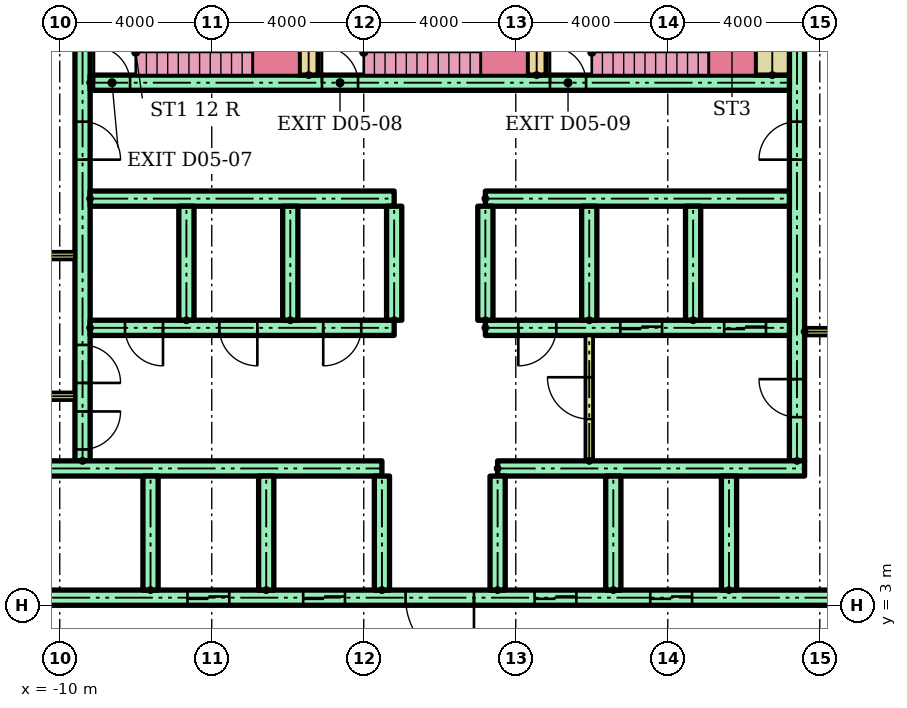
"""IFC4 building model, lengths in metres.
Left out: names, types, materials, properties, quantities, classifications, styles, units other than length and angle.
Written with IfcOpenShell. Run it as: python <this file> out.ifc"""

import sys

from ifc_helpers import new_model, si_unit, direction, frame, frame_2d, origin, place, context, subcontext, project, spatial, rectangle, extrude, element, fill, save


model = new_model("IFC4")
c1 = context("Model", 3, precision=1e-05, world=origin(), true_north=direction((0.0, 1.0)))
c2 = subcontext(c1, "Body", "Model", "MODEL_VIEW")
j1 = project(units=[si_unit("LENGTHUNIT", "METRE"), si_unit("PLANEANGLEUNIT", "RADIAN")], contexts=[c1])
p1 = place(None, origin())
s1 = spatial("IfcSite", under=j1, at=p1, CompositionType="ELEMENT")
p2 = place(p1, origin())
s2 = spatial("IfcBuilding", under=s1, at=p2, CompositionType="ELEMENT")
p3 = place(p2, frame((0.0, 0.0, 22.0)))
s3 = spatial("IfcBuildingStorey", under=s2, at=p3, CompositionType="ELEMENT", Elevation=22.0)
p4 = place(p3, frame((-9.4, 6.8, 0.0), z_axis=(0.0, 0.0, 1.0), x_axis=(0.0, 1.0, 0.0)))
e1 = element("IfcWall", 1, at=p4, inside=s3, PredefinedType="SHEAR", context=c2, shape_type="SweptSolid", body=[
    extrude(rectangle(XDim=12.7, YDim=0.4, at=frame_2d((6.35, 0.0))), origin(), (0.0, 0.0, 1.0), 3.2),
])
p5 = place(p4, frame((0.3, 0.0, 0.0)))
e2 = element("IfcOpeningElement", 2, at=p5, cuts=e1, PredefinedType="OPENING", context=c2, shape_type="SweptSolid", body=[
    extrude(rectangle(XDim=1.0, YDim=2.1, at=frame_2d((0.5, 1.05))), frame((0.0, 0.21, 0.0), z_axis=(0.0, -1.0, 0.0), x_axis=(1.0, 0.0, 0.0)), (0.0, 0.0, 1.0), 0.42),
])
p6 = place(p4, frame((2.05, 0.0, 0.0)))
e3 = element("IfcOpeningElement", 3, at=p6, cuts=e1, PredefinedType="OPENING", context=c2, shape_type="SweptSolid", body=[
    extrude(rectangle(XDim=1.0, YDim=2.1, at=frame_2d((0.5, 1.05))), frame((0.0, 0.21, 0.0), z_axis=(0.0, -1.0, 0.0), x_axis=(1.0, 0.0, 0.0)), (0.0, 0.0, 1.0), 0.42),
])
p7 = place(p4, frame((7.925, 0.0, 0.0)))
e4 = element("IfcOpeningElement", 4, at=p7, cuts=e1, PredefinedType="OPENING", context=c2, shape_type="SweptSolid", body=[
    extrude(rectangle(XDim=1.0, YDim=2.1, at=frame_2d((0.5, 1.05))), frame((0.0, 0.21, 0.0), z_axis=(0.0, -1.0, 0.0), x_axis=(1.0, 0.0, 0.0)), (0.0, 0.0, 1.0), 0.42),
])
p8 = place(p3, frame((9.4, 6.8, 0.0), z_axis=(0.0, 0.0, 1.0), x_axis=(0.0, 1.0, 0.0)))
e5 = element("IfcWall", 5, at=p8, inside=s3, PredefinedType="SHEAR", context=c2, shape_type="SweptSolid", body=[
    extrude(rectangle(XDim=12.7, YDim=0.4, at=frame_2d((6.35, 0.0))), origin(), (0.0, 0.0, 1.0), 3.2),
])
p9 = place(p8, frame((1.15, 0.0, 0.0)))
e6 = element("IfcOpeningElement", 6, at=p9, cuts=e5, PredefinedType="OPENING", context=c2, shape_type="SweptSolid", body=[
    extrude(rectangle(XDim=1.0, YDim=2.1, at=frame_2d((0.5, 1.05))), frame((0.0, 0.21, 0.0), z_axis=(0.0, -1.0, 0.0), x_axis=(1.0, 0.0, 0.0)), (0.0, 0.0, 1.0), 0.42),
])
p10 = place(p8, frame((7.925, 0.0, 0.0)))
e7 = element("IfcOpeningElement", 7, at=p10, cuts=e5, PredefinedType="OPENING", context=c2, shape_type="SweptSolid", body=[
    extrude(rectangle(XDim=1.0, YDim=2.1, at=frame_2d((0.5, 1.05))), frame((0.0, 0.21, 0.0), z_axis=(0.0, -1.0, 0.0), x_axis=(1.0, 0.0, 0.0)), (0.0, 0.0, 1.0), 0.42),
])
p11 = place(p3, frame((-13.5, 3.2, 0.0)))
e8 = element("IfcWall", 8, at=p11, inside=s3, PredefinedType="SHEAR", context=c2, shape_type="SweptSolid", body=[
    extrude(rectangle(XDim=27.0, YDim=0.4, at=frame_2d((13.5, 0.0))), origin(), (0.0, 0.0, 1.0), 3.2),
])
p12 = place(p11, frame((6.861, 0.0, 0.0)))
e9 = element("IfcOpeningElement", 9, at=p12, cuts=e8, PredefinedType="OPENING", context=c2, shape_type="SweptSolid", body=[
    extrude(rectangle(XDim=1.1, YDim=2.1, at=frame_2d((0.55, 1.05))), frame((0.0, 0.21, 0.0), z_axis=(0.0, -1.0, 0.0), x_axis=(1.0, 0.0, 0.0)), (0.0, 0.0, 1.0), 0.42),
])
p13 = place(p11, frame((9.906, 0.0, 0.0)))
e10 = element("IfcOpeningElement", 10, at=p13, cuts=e8, PredefinedType="OPENING", context=c2, shape_type="SweptSolid", body=[
    extrude(rectangle(XDim=1.1, YDim=2.1, at=frame_2d((0.55, 1.05))), frame((0.0, 0.21, 0.0), z_axis=(0.0, -1.0, 0.0), x_axis=(1.0, 0.0, 0.0)), (0.0, 0.0, 1.0), 0.42),
])
p14 = place(p11, frame((15.994, 0.0, 0.0)))
e11 = element("IfcOpeningElement", 11, at=p14, cuts=e8, PredefinedType="OPENING", context=c2, shape_type="SweptSolid", body=[
    extrude(rectangle(XDim=1.1, YDim=2.1, at=frame_2d((0.55, 1.05))), frame((0.0, 0.21, 0.0), z_axis=(0.0, -1.0, 0.0), x_axis=(1.0, 0.0, 0.0)), (0.0, 0.0, 1.0), 0.42),
])
p15 = place(p11, frame((19.039, 0.0, 0.0)))
e12 = element("IfcOpeningElement", 12, at=p15, cuts=e8, PredefinedType="OPENING", context=c2, shape_type="SweptSolid", body=[
    extrude(rectangle(XDim=1.1, YDim=2.1, at=frame_2d((0.55, 1.05))), frame((0.0, 0.21, 0.0), z_axis=(0.0, -1.0, 0.0), x_axis=(1.0, 0.0, 0.0)), (0.0, 0.0, 1.0), 0.42),
])
p16 = place(p11, frame((12.6, 0.0, 0.0)))
e13 = element("IfcOpeningElement", 13, at=p16, cuts=e8, PredefinedType="OPENING", context=c2, shape_type="SweptSolid", body=[
    extrude(rectangle(XDim=1.8, YDim=2.1, at=frame_2d((0.9, 1.05))), frame((0.0, 0.21, 0.0), z_axis=(0.0, -1.0, 0.0), x_axis=(1.0, 0.0, 0.0)), (0.0, 0.0, 1.0), 0.42),
])
p17 = place(p3, frame((-13.5, 6.6, 0.0)))
e14 = element("IfcWall", 14, at=p17, inside=s3, PredefinedType="SHEAR", context=c2, shape_type="SweptSolid", body=[
    extrude(rectangle(XDim=11.978, YDim=0.4, at=frame_2d((5.989, 0.0))), origin(), (0.0, 0.0, 1.0), 3.2),
])
p18 = place(p3, frame((1.522, 6.6, 0.0)))
e15 = element("IfcWall", 15, at=p18, inside=s3, PredefinedType="SHEAR", context=c2, shape_type="SweptSolid", body=[
    extrude(rectangle(XDim=8.078, YDim=0.4, at=frame_2d((4.039, 0.0))), origin(), (0.0, 0.0, 1.0), 3.2),
])
for number, where, z_axis, x_axis in (
    (16, (-7.611, 3.4, 0.0), (0.0, 0.0, 1.0), (0.0, 1.0, 0.0)),
    (17, (-4.567, 3.4, 0.0), (0.0, 0.0, 1.0), (0.0, 1.0, 0.0)),
    (18, (-1.522, 3.4, 0.0), (0.0, 0.0, 1.0), (0.0, 1.0, 0.0)),
    (19, (1.522, 3.4, 0.0), (0.0, 0.0, 1.0), (0.0, 1.0, 0.0)),
    (20, (4.567, 3.4, 0.0), (0.0, 0.0, 1.0), (0.0, 1.0, 0.0)),
    (21, (7.611, 3.4, 0.0), (0.0, 0.0, 1.0), (0.0, 1.0, 0.0)),
):
    element("IfcWall", number, at=place(p3, frame(where, z_axis=z_axis, x_axis=x_axis)), inside=s3, PredefinedType="SHEAR", context=c2, shape_type="SweptSolid", body=[
        extrude(rectangle(XDim=3.0, YDim=0.4, at=frame_2d((1.5, 0.0))), origin(), (0.0, 0.0, 1.0), 3.2),
    ])
p19 = place(p3, frame((-9.2, 10.3, 0.0)))
e22 = element("IfcWall", 22, at=p19, inside=s3, PredefinedType="SHEAR", context=c2, shape_type="SweptSolid", body=[
    extrude(rectangle(XDim=8.0, YDim=0.4, at=frame_2d((4.0, 0.0))), origin(), (0.0, 0.0, 1.0), 3.2),
])
p20 = place(p19, frame((0.917, 0.0, 0.0)))
e23 = element("IfcOpeningElement", 23, at=p20, cuts=e22, PredefinedType="OPENING", context=c2, shape_type="SweptSolid", body=[
    extrude(rectangle(XDim=1.0, YDim=2.1, at=frame_2d((0.5, 1.05))), frame((0.0, 0.21, 0.0), z_axis=(0.0, -1.0, 0.0), x_axis=(1.0, 0.0, 0.0)), (0.0, 0.0, 1.0), 0.42),
])
p21 = place(p19, frame((3.4, 0.0, 0.0)))
e24 = element("IfcOpeningElement", 24, at=p21, cuts=e22, PredefinedType="OPENING", context=c2, shape_type="SweptSolid", body=[
    extrude(rectangle(XDim=1.0, YDim=2.1, at=frame_2d((0.5, 1.05))), frame((0.0, 0.21, 0.0), z_axis=(0.0, -1.0, 0.0), x_axis=(1.0, 0.0, 0.0)), (0.0, 0.0, 1.0), 0.42),
])
p22 = place(p19, frame((6.133, 0.0, 0.0)))
e25 = element("IfcOpeningElement", 25, at=p22, cuts=e22, PredefinedType="OPENING", context=c2, shape_type="SweptSolid", body=[
    extrude(rectangle(XDim=1.0, YDim=2.1, at=frame_2d((0.5, 1.05))), frame((0.0, 0.21, 0.0), z_axis=(0.0, -1.0, 0.0), x_axis=(1.0, 0.0, 0.0)), (0.0, 0.0, 1.0), 0.42),
])
p23 = place(p3, frame((-9.2, 13.7, 0.0)))
e26 = element("IfcWall", 26, at=p23, inside=s3, PredefinedType="SHEAR", context=c2, shape_type="SweptSolid", body=[
    extrude(rectangle(XDim=8.0, YDim=0.4, at=frame_2d((4.0, 0.0))), origin(), (0.0, 0.0, 1.0), 3.2),
])
p24 = place(p3, frame((1.2, 10.3, 0.0)))
e27 = element("IfcWall", 27, at=p24, inside=s3, PredefinedType="SHEAR", context=c2, shape_type="SweptSolid", body=[
    extrude(rectangle(XDim=8.0, YDim=0.4, at=frame_2d((4.0, 0.0))), origin(), (0.0, 0.0, 1.0), 3.2),
])
p25 = place(p24, frame((3.55, 0.0, 0.0)))
e28 = element("IfcOpeningElement", 28, at=p25, cuts=e27, PredefinedType="OPENING", context=c2, shape_type="SweptSolid", body=[
    extrude(rectangle(XDim=1.1, YDim=2.1, at=frame_2d((0.55, 1.05))), frame((0.0, 0.21, 0.0), z_axis=(0.0, -1.0, 0.0), x_axis=(1.0, 0.0, 0.0)), (0.0, 0.0, 1.0), 0.42),
])
p26 = place(p24, frame((6.283, 0.0, 0.0)))
e29 = element("IfcOpeningElement", 29, at=p26, cuts=e27, PredefinedType="OPENING", context=c2, shape_type="SweptSolid", body=[
    extrude(rectangle(XDim=1.1, YDim=2.1, at=frame_2d((0.55, 1.05))), frame((0.0, 0.21, 0.0), z_axis=(0.0, -1.0, 0.0), x_axis=(1.0, 0.0, 0.0)), (0.0, 0.0, 1.0), 0.42),
])
p27 = place(p24, frame((0.867, 0.0, 0.0)))
e30 = element("IfcOpeningElement", 30, at=p27, cuts=e27, PredefinedType="OPENING", context=c2, shape_type="SweptSolid", body=[
    extrude(rectangle(XDim=1.0, YDim=2.1, at=frame_2d((0.5, 1.05))), frame((0.0, 0.21, 0.0), z_axis=(0.0, -1.0, 0.0), x_axis=(1.0, 0.0, 0.0)), (0.0, 0.0, 1.0), 0.42),
])
p28 = place(p3, frame((1.2, 13.7, 0.0)))
e31 = element("IfcWall", 31, at=p28, inside=s3, PredefinedType="SHEAR", context=c2, shape_type="SweptSolid", body=[
    extrude(rectangle(XDim=8.0, YDim=0.4, at=frame_2d((4.0, 0.0))), origin(), (0.0, 0.0, 1.0), 3.2),
])
for number, where, z_axis, x_axis in (
    (32, (-6.667, 10.5, 0.0), (0.0, 0.0, 1.0), (0.0, 1.0, 0.0)),
    (33, (-3.933, 10.5, 0.0), (0.0, 0.0, 1.0), (0.0, 1.0, 0.0)),
    (34, (-1.2, 10.5, 0.0), (0.0, 0.0, 1.0), (0.0, 1.0, 0.0)),
    (35, (1.2, 10.5, 0.0), (0.0, 0.0, 1.0), (0.0, 1.0, 0.0)),
    (36, (3.933, 10.5, 0.0), (0.0, 0.0, 1.0), (0.0, 1.0, 0.0)),
    (37, (6.667, 10.5, 0.0), (0.0, 0.0, 1.0), (0.0, 1.0, 0.0)),
):
    element("IfcWall", number, at=place(p3, frame(where, z_axis=z_axis, x_axis=x_axis)), inside=s3, PredefinedType="SHEAR", context=c2, shape_type="SweptSolid", body=[
        extrude(rectangle(XDim=3.0, YDim=0.4, at=frame_2d((1.5, 0.0))), origin(), (0.0, 0.0, 1.0), 3.2),
    ])
p29 = place(p3, frame((3.933, 6.8, 0.0), z_axis=(0.0, 0.0, 1.0), x_axis=(0.0, 1.0, 0.0)))
e38 = element("IfcWall", 38, at=p29, inside=s3, PredefinedType="PARTITIONING", context=c2, shape_type="SweptSolid", body=[
    extrude(rectangle(XDim=3.3, YDim=0.2, at=frame_2d((1.65, 0.0))), origin(), (0.0, 0.0, 1.0), 3.2),
])
p30 = place(p29, frame((1.1, 0.0, 0.0)))
e39 = element("IfcOpeningElement", 39, at=p30, cuts=e38, PredefinedType="OPENING", context=c2, shape_type="SweptSolid", body=[
    extrude(rectangle(XDim=1.1, YDim=2.1, at=frame_2d((0.55, 1.05))), frame((0.0, 0.11, 0.0), z_axis=(0.0, -1.0, 0.0), x_axis=(1.0, 0.0, 0.0)), (0.0, 0.0, 1.0), 0.22),
])
p31 = place(p3, frame((-9.2, 16.75, 0.0)))
e40 = element("IfcWall", 40, at=p31, inside=s3, PredefinedType="SHEAR", context=c2, shape_type="SweptSolid", body=[
    extrude(rectangle(XDim=18.4, YDim=0.4, at=frame_2d((9.2, 0.0))), origin(), (0.0, 0.0, 1.0), 3.2),
])
p32 = place(p31, frame((0.1, 0.0, 0.0)))
e41 = element("IfcOpeningElement", 41, at=p32, cuts=e40, PredefinedType="OPENING", context=c2, shape_type="SweptSolid", body=[
    extrude(rectangle(XDim=0.95, YDim=2.1, at=frame_2d((0.475, 1.05))), frame((0.0, 0.21, 0.0), z_axis=(0.0, -1.0, 0.0), x_axis=(1.0, 0.0, 0.0)), (0.0, 0.0, 1.0), 0.42),
])
p33 = place(p31, frame((6.1, 0.0, 0.0)))
e42 = element("IfcOpeningElement", 42, at=p33, cuts=e40, PredefinedType="OPENING", context=c2, shape_type="SweptSolid", body=[
    extrude(rectangle(XDim=0.95, YDim=2.1, at=frame_2d((0.475, 1.05))), frame((0.0, 0.21, 0.0), z_axis=(0.0, -1.0, 0.0), x_axis=(1.0, 0.0, 0.0)), (0.0, 0.0, 1.0), 0.42),
])
p34 = place(p31, frame((12.1, 0.0, 0.0)))
e43 = element("IfcOpeningElement", 43, at=p34, cuts=e40, PredefinedType="OPENING", context=c2, shape_type="SweptSolid", body=[
    extrude(rectangle(XDim=0.95, YDim=2.1, at=frame_2d((0.475, 1.05))), frame((0.0, 0.21, 0.0), z_axis=(0.0, -1.0, 0.0), x_axis=(1.0, 0.0, 0.0)), (0.0, 0.0, 1.0), 0.42),
])
for number, where, z_axis, x_axis in (
    (44, (-3.45, 16.95, 0.0), (0.0, 0.0, 1.0), (0.0, 1.0, 0.0)),
    (45, (2.55, 16.95, 0.0), (0.0, 0.0, 1.0), (0.0, 1.0, 0.0)),
):
    element("IfcWall", number, at=place(p3, frame(where, z_axis=z_axis, x_axis=x_axis)), inside=s3, PredefinedType="SHEAR", context=c2, shape_type="SweptSolid", body=[
        extrude(rectangle(XDim=2.55, YDim=0.5, at=frame_2d((1.275, 0.0))), origin(), (0.0, 0.0, 1.0), 3.2),
    ])
p35 = place(p3, frame((8.75, 16.95, 0.0), z_axis=(0.0, 0.0, 1.0), x_axis=(0.0, 1.0, 0.0)))
e46 = element("IfcWall", 46, at=p35, inside=s3, PredefinedType="SHEAR", context=c2, shape_type="SweptSolid", body=[
    extrude(rectangle(XDim=2.55, YDim=0.9, at=frame_2d((1.275, 0.0))), origin(), (0.0, 0.0, 1.0), 3.2),
])
for number, where in (
    (47, (-13.5, 8.5, 0.0)),
    (48, (-13.5, 12.2, 0.0)),
    (49, (9.6, 10.2, 0.0)),
):
    element("IfcWall", number, at=place(p3, frame(where)), inside=s3, PredefinedType="PARTITIONING", context=c2, shape_type="SweptSolid", body=[
        extrude(rectangle(XDim=3.9, YDim=0.2, at=frame_2d((1.95, 0.0))), origin(), (0.0, 0.0, 1.0), 3.2),
    ])
p36 = place(p12, origin())
e50 = element("IfcDoor", 50, at=p36, inside=s3, OperationType="SLIDING_TO_LEFT", PredefinedType="DOOR", context=c2, shape_type="SweptSolid", body=[
    extrude(rectangle(XDim=1.1, YDim=2.1, at=frame_2d((0.55, 1.05))), frame((0.0, 0.025, 0.0), z_axis=(0.0, -1.0, 0.0), x_axis=(1.0, 0.0, 0.0)), (0.0, 0.0, 1.0), 0.05),
])
fill(e9, e50)
p37 = place(p13, origin())
e51 = element("IfcDoor", 51, at=p37, inside=s3, OperationType="SLIDING_TO_LEFT", PredefinedType="DOOR", context=c2, shape_type="SweptSolid", body=[
    extrude(rectangle(XDim=1.1, YDim=2.1, at=frame_2d((0.55, 1.05))), frame((0.0, 0.025, 0.0), z_axis=(0.0, -1.0, 0.0), x_axis=(1.0, 0.0, 0.0)), (0.0, 0.0, 1.0), 0.05),
])
fill(e10, e51)
p38 = place(p14, origin())
e52 = element("IfcDoor", 52, at=p38, inside=s3, OperationType="SLIDING_TO_LEFT", PredefinedType="DOOR", context=c2, shape_type="SweptSolid", body=[
    extrude(rectangle(XDim=1.1, YDim=2.1, at=frame_2d((0.55, 1.05))), frame((0.0, 0.025, 0.0), z_axis=(0.0, -1.0, 0.0), x_axis=(1.0, 0.0, 0.0)), (0.0, 0.0, 1.0), 0.05),
])
fill(e11, e52)
p39 = place(p15, origin())
e53 = element("IfcDoor", 53, at=p39, inside=s3, OperationType="SLIDING_TO_LEFT", PredefinedType="DOOR", context=c2, shape_type="SweptSolid", body=[
    extrude(rectangle(XDim=1.1, YDim=2.1, at=frame_2d((0.55, 1.05))), frame((0.0, 0.025, 0.0), z_axis=(0.0, -1.0, 0.0), x_axis=(1.0, 0.0, 0.0)), (0.0, 0.0, 1.0), 0.05),
])
fill(e12, e53)
p40 = place(p16, frame((1.8, 0.0, 0.0), z_axis=(0.0, 0.0, 1.0), x_axis=(-1.0, 0.0, 0.0)))
e54 = element("IfcDoor", 54, at=p40, inside=s3, OperationType="DOUBLE_DOOR_SINGLE_SWING", PredefinedType="DOOR", context=c2, shape_type="SweptSolid", body=[
    extrude(rectangle(XDim=1.8, YDim=2.1, at=frame_2d((0.9, 1.05))), frame((0.0, 0.025, 0.0), z_axis=(0.0, -1.0, 0.0), x_axis=(1.0, 0.0, 0.0)), (0.0, 0.0, 1.0), 0.05),
])
fill(e13, e54)
p41 = place(p25, origin())
e55 = element("IfcDoor", 55, at=p41, inside=s3, OperationType="SLIDING_TO_LEFT", PredefinedType="DOOR", context=c2, shape_type="SweptSolid", body=[
    extrude(rectangle(XDim=1.1, YDim=2.1, at=frame_2d((0.55, 1.05))), frame((0.0, 0.025, 0.0), z_axis=(0.0, -1.0, 0.0), x_axis=(1.0, 0.0, 0.0)), (0.0, 0.0, 1.0), 0.05),
])
fill(e28, e55)
p42 = place(p26, origin())
e56 = element("IfcDoor", 56, at=p42, inside=s3, OperationType="SLIDING_TO_LEFT", PredefinedType="DOOR", context=c2, shape_type="SweptSolid", body=[
    extrude(rectangle(XDim=1.1, YDim=2.1, at=frame_2d((0.55, 1.05))), frame((0.0, 0.025, 0.0), z_axis=(0.0, -1.0, 0.0), x_axis=(1.0, 0.0, 0.0)), (0.0, 0.0, 1.0), 0.05),
])
fill(e29, e56)
p43 = place(p20, frame((1.0, 0.0, 0.0), z_axis=(0.0, 0.0, 1.0), x_axis=(-1.0, 0.0, 0.0)))
e57 = element("IfcDoor", 57, at=p43, inside=s3, OperationType="SINGLE_SWING_RIGHT", PredefinedType="DOOR", context=c2, shape_type="SweptSolid", body=[
    extrude(rectangle(XDim=1.0, YDim=2.1, at=frame_2d((0.5, 1.05))), frame((0.0, 0.025, 0.0), z_axis=(0.0, -1.0, 0.0), x_axis=(1.0, 0.0, 0.0)), (0.0, 0.0, 1.0), 0.05),
])
fill(e23, e57)
p44 = place(p21, frame((1.0, 0.0, 0.0), z_axis=(0.0, 0.0, 1.0), x_axis=(-1.0, 0.0, 0.0)))
e58 = element("IfcDoor", 58, at=p44, inside=s3, OperationType="SINGLE_SWING_RIGHT", PredefinedType="DOOR", context=c2, shape_type="SweptSolid", body=[
    extrude(rectangle(XDim=1.0, YDim=2.1, at=frame_2d((0.5, 1.05))), frame((0.0, 0.025, 0.0), z_axis=(0.0, -1.0, 0.0), x_axis=(1.0, 0.0, 0.0)), (0.0, 0.0, 1.0), 0.05),
])
fill(e24, e58)
p45 = place(p22, frame((1.0, 0.0, 0.0), z_axis=(0.0, 0.0, 1.0), x_axis=(-1.0, 0.0, 0.0)))
e59 = element("IfcDoor", 59, at=p45, inside=s3, OperationType="SINGLE_SWING_LEFT", PredefinedType="DOOR", context=c2, shape_type="SweptSolid", body=[
    extrude(rectangle(XDim=1.0, YDim=2.1, at=frame_2d((0.5, 1.05))), frame((0.0, 0.025, 0.0), z_axis=(0.0, -1.0, 0.0), x_axis=(1.0, 0.0, 0.0)), (0.0, 0.0, 1.0), 0.05),
])
fill(e25, e59)
p46 = place(p27, frame((1.0, 0.0, 0.0), z_axis=(0.0, 0.0, 1.0), x_axis=(-1.0, 0.0, 0.0)))
e60 = element("IfcDoor", 60, at=p46, inside=s3, OperationType="SINGLE_SWING_LEFT", PredefinedType="DOOR", context=c2, shape_type="SweptSolid", body=[
    extrude(rectangle(XDim=1.0, YDim=2.1, at=frame_2d((0.5, 1.05))), frame((0.0, 0.025, 0.0), z_axis=(0.0, -1.0, 0.0), x_axis=(1.0, 0.0, 0.0)), (0.0, 0.0, 1.0), 0.05),
])
fill(e30, e60)
p47 = place(p30, origin())
e61 = element("IfcDoor", 61, at=p47, inside=s3, OperationType="SINGLE_SWING_RIGHT", PredefinedType="DOOR", context=c2, shape_type="SweptSolid", body=[
    extrude(rectangle(XDim=1.1, YDim=2.1, at=frame_2d((0.55, 1.05))), frame((0.0, 0.025, 0.0), z_axis=(0.0, -1.0, 0.0), x_axis=(1.0, 0.0, 0.0)), (0.0, 0.0, 1.0), 0.05),
])
fill(e39, e61)
p48 = place(p32, origin())
e62 = element("IfcDoor", 62, at=p48, inside=s3, OperationType="SINGLE_SWING_LEFT", PredefinedType="DOOR", context=c2, shape_type="SweptSolid", body=[
    extrude(rectangle(XDim=0.95, YDim=2.1, at=frame_2d((0.475, 1.05))), frame((0.0, 0.025, 0.0), z_axis=(0.0, -1.0, 0.0), x_axis=(1.0, 0.0, 0.0)), (0.0, 0.0, 1.0), 0.05),
])
fill(e41, e62)
p49 = place(p33, origin())
e63 = element("IfcDoor", 63, at=p49, inside=s3, OperationType="SINGLE_SWING_LEFT", PredefinedType="DOOR", context=c2, shape_type="SweptSolid", body=[
    extrude(rectangle(XDim=0.95, YDim=2.1, at=frame_2d((0.475, 1.05))), frame((0.0, 0.025, 0.0), z_axis=(0.0, -1.0, 0.0), x_axis=(1.0, 0.0, 0.0)), (0.0, 0.0, 1.0), 0.05),
])
fill(e42, e63)
p50 = place(p34, origin())
e64 = element("IfcDoor", 64, at=p50, inside=s3, OperationType="SINGLE_SWING_LEFT", PredefinedType="DOOR", context=c2, shape_type="SweptSolid", body=[
    extrude(rectangle(XDim=0.95, YDim=2.1, at=frame_2d((0.475, 1.05))), frame((0.0, 0.025, 0.0), z_axis=(0.0, -1.0, 0.0), x_axis=(1.0, 0.0, 0.0)), (0.0, 0.0, 1.0), 0.05),
])
fill(e43, e64)
p51 = place(p5, frame((1.0, 0.0, 0.0), z_axis=(0.0, 0.0, 1.0), x_axis=(-1.0, 0.0, 0.0)))
e65 = element("IfcDoor", 65, at=p51, inside=s3, OperationType="SINGLE_SWING_RIGHT", PredefinedType="DOOR", context=c2, shape_type="SweptSolid", body=[
    extrude(rectangle(XDim=1.0, YDim=2.1, at=frame_2d((0.5, 1.05))), frame((0.0, 0.025, 0.0), z_axis=(0.0, -1.0, 0.0), x_axis=(1.0, 0.0, 0.0)), (0.0, 0.0, 1.0), 0.05),
])
fill(e2, e65)
p52 = place(p6, frame((1.0, 0.0, 0.0), z_axis=(0.0, 0.0, 1.0), x_axis=(-1.0, 0.0, 0.0)))
e66 = element("IfcDoor", 66, at=p52, inside=s3, OperationType="SINGLE_SWING_LEFT", PredefinedType="DOOR", context=c2, shape_type="SweptSolid", body=[
    extrude(rectangle(XDim=1.0, YDim=2.1, at=frame_2d((0.5, 1.05))), frame((0.0, 0.025, 0.0), z_axis=(0.0, -1.0, 0.0), x_axis=(1.0, 0.0, 0.0)), (0.0, 0.0, 1.0), 0.05),
])
fill(e3, e66)
p53 = place(p7, frame((1.0, 0.0, 0.0), z_axis=(0.0, 0.0, 1.0), x_axis=(-1.0, 0.0, 0.0)))
e67 = element("IfcDoor", 67, at=p53, inside=s3, OperationType="SINGLE_SWING_LEFT", PredefinedType="DOOR", context=c2, shape_type="SweptSolid", body=[
    extrude(rectangle(XDim=1.0, YDim=2.1, at=frame_2d((0.5, 1.05))), frame((0.0, 0.025, 0.0), z_axis=(0.0, -1.0, 0.0), x_axis=(1.0, 0.0, 0.0)), (0.0, 0.0, 1.0), 0.05),
])
fill(e4, e67)
p54 = place(p9, origin())
e68 = element("IfcDoor", 68, at=p54, inside=s3, OperationType="SINGLE_SWING_RIGHT", PredefinedType="DOOR", context=c2, shape_type="SweptSolid", body=[
    extrude(rectangle(XDim=1.0, YDim=2.1, at=frame_2d((0.5, 1.05))), frame((0.0, 0.025, 0.0), z_axis=(0.0, -1.0, 0.0), x_axis=(1.0, 0.0, 0.0)), (0.0, 0.0, 1.0), 0.05),
])
fill(e6, e68)
p55 = place(p10, origin())
e69 = element("IfcDoor", 69, at=p55, inside=s3, OperationType="SINGLE_SWING_LEFT", PredefinedType="DOOR", context=c2, shape_type="SweptSolid", body=[
    extrude(rectangle(XDim=1.0, YDim=2.1, at=frame_2d((0.5, 1.05))), frame((0.0, 0.025, 0.0), z_axis=(0.0, -1.0, 0.0), x_axis=(1.0, 0.0, 0.0)), (0.0, 0.0, 1.0), 0.05),
])
fill(e7, e69)
save(model, sys.argv[1])
